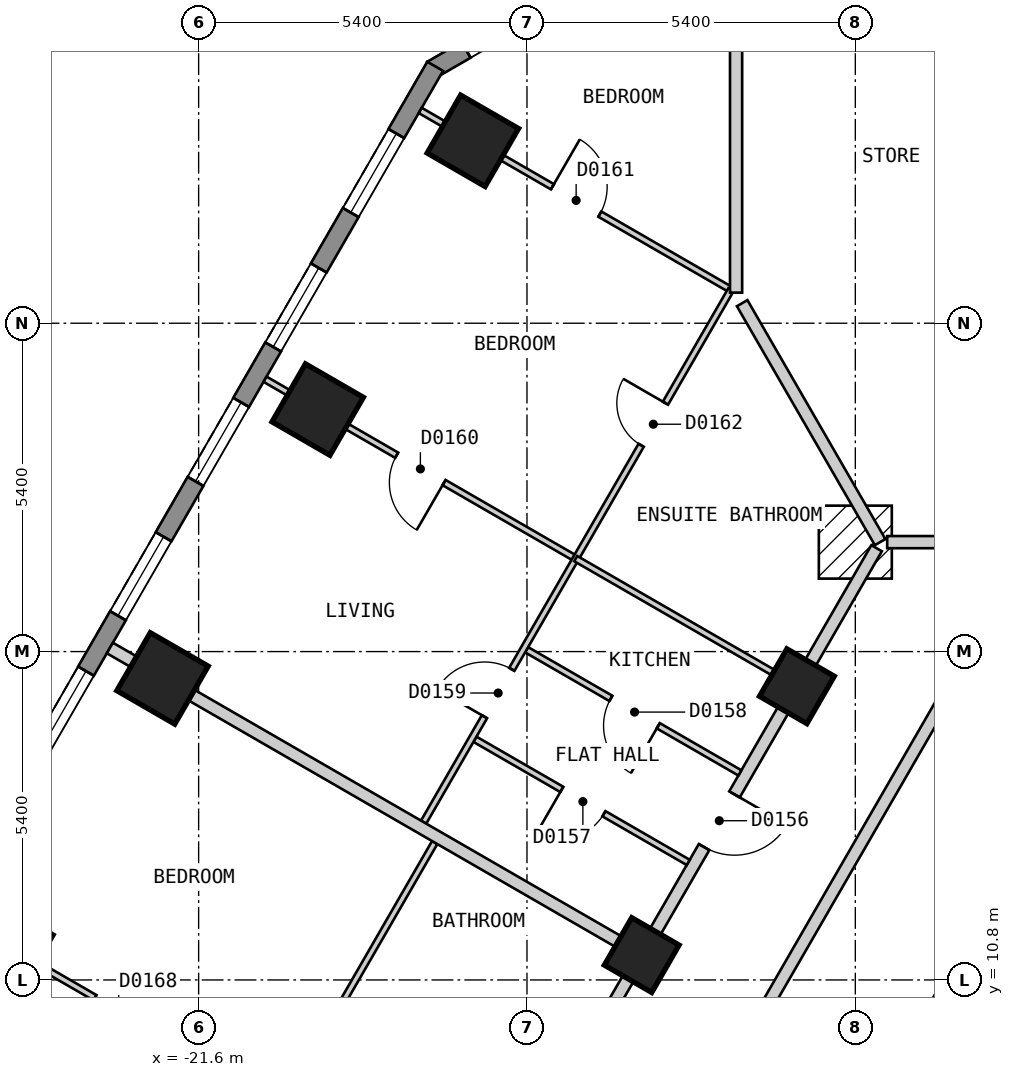
"""IFC4 building model, lengths in metres.
Left out: names, types, materials, properties, quantities, classifications, styles, units other than length and angle.
Written with IfcOpenShell. Run it as: python <this file> out.ifc"""

import sys

from ifc_helpers import new_model, si_unit, direction, frame, frame_2d, origin, origin_2d, place, context, subcontext, project, spatial, polyline, rectangle, outline, extrude, element, fill, save


model = new_model("IFC4")
c1 = context("Model", 3, precision=1e-05, world=origin(), true_north=direction((0.0, 1.0)))
c2 = subcontext(c1, "Body", "Model", "MODEL_VIEW")
j1 = project(units=[si_unit("LENGTHUNIT", "METRE"), si_unit("PLANEANGLEUNIT", "RADIAN")], contexts=[c1])
p1 = place(None, origin())
s1 = spatial("IfcSite", under=j1, at=p1, CompositionType="ELEMENT")
p2 = place(p1, origin())
s2 = spatial("IfcBuilding", under=s1, at=p2, CompositionType="ELEMENT")
p3 = place(p2, frame((0.0, 0.0, 23.4)))
s3 = spatial("IfcBuildingStorey", under=s2, at=p3, CompositionType="ELEMENT", Elevation=23.4)
for number, where, z_axis, x_axis in (
    (1, (-17.09, 24.6, 0.0), (0.0, 0.0, 1.0), (-0.5, -0.866, 0.0)),
    (2, (-19.642, 20.18, 0.0), (0.0, 0.0, 1.0), (-0.5, -0.866, 0.0)),
    (3, (-22.194, 15.759, 0.0), (0.0, 0.0, 1.0), (-0.5, -0.866, 0.0)),
    (4, (-24.746, 11.339, 0.0), (0.0, 0.0, 1.0), (-0.5, -0.866, 0.0)),
):
    element("IfcColumn", number, at=place(p3, frame(where, z_axis=z_axis, x_axis=x_axis)), inside=s3, PredefinedType="COLUMN", context=c2, shape_type="SweptSolid", body=[
        extrude(rectangle(XDim=1.1, YDim=1.1, at=origin_2d()), origin(), (0.0, 0.0, 1.0), 3.0),
    ])
for number, where, z_axis, x_axis in (
    (5, (-11.761, 15.63, 0.0), (0.0, 0.0, 1.0), (-0.5, -0.866, 0.0)),
    (6, (-14.313, 11.209, 0.0), (0.0, 0.0, 1.0), (-0.5, -0.866, 0.0)),
):
    element("IfcColumn", number, at=place(p3, frame(where, z_axis=z_axis, x_axis=x_axis)), inside=s3, PredefinedType="COLUMN", context=c2, shape_type="SweptSolid", body=[
        extrude(rectangle(XDim=0.9, YDim=0.9, at=origin_2d()), origin(), (0.0, 0.0, 1.0), 3.0),
    ])
p4 = place(p3, frame((-13.435, 28.27, 0.0), z_axis=(0.0, 0.0, 1.0), x_axis=(-0.866010750942, -0.50002537861, 0.0)))
e7 = element("IfcWall", 7, at=p4, inside=s3, PredefinedType="SOLIDWALL", context=c2, shape_type="SweptSolid", body=[
    extrude(outline(polyline([(0.0, -0.15), (5.0, -0.15), (4.919, 0.15), (0.08, 0.15), (0.0, -0.15)])), origin(), (0.0, 0.0, 1.0), 2.7),
])
p5 = place(p4, frame((0.65, 0.0, 0.15)))
e8 = element("IfcOpeningElement", 8, at=p5, cuts=e7, PredefinedType="OPENING", context=c2, shape_type="SweptSolid", body=[
    extrude(rectangle(XDim=1.2, YDim=2.1, at=frame_2d((0.6, 1.05))), frame((0.0, 0.16, 0.0), z_axis=(0.0, -1.0, 0.0), x_axis=(1.0, 0.0, 0.0)), (0.0, 0.0, 1.0), 0.32),
])
p6 = place(p4, frame((3.149, 0.0, 0.15)))
e9 = element("IfcOpeningElement", 9, at=p6, cuts=e7, PredefinedType="OPENING", context=c2, shape_type="SweptSolid", body=[
    extrude(rectangle(XDim=1.2, YDim=2.1, at=frame_2d((0.6, 1.05))), frame((0.0, 0.16, 0.0), z_axis=(0.0, -1.0, 0.0), x_axis=(1.0, 0.0, 0.0)), (0.0, 0.0, 1.0), 0.32),
])
p7 = place(p3, frame((-17.71, 25.825, 0.0), z_axis=(0.0, 0.0, 1.0), x_axis=(-0.500001938803, -0.866024284413, 0.0)))
e10 = element("IfcWall", 10, at=p7, inside=s3, PredefinedType="SOLIDWALL", context=c2, shape_type="SweptSolid", body=[
    extrude(outline(polyline([(0.0, -0.15), (27.02, -0.15), (26.94, 0.15), (0.08, 0.15), (0.0, -0.15)])), origin(), (0.0, 0.0, 1.0), 2.7),
])
p8 = place(p7, frame((1.277, 0.0, 0.15)))
e11 = element("IfcOpeningElement", 11, at=p8, cuts=e10, PredefinedType="OPENING", context=c2, shape_type="SweptSolid", body=[
    extrude(rectangle(XDim=1.5, YDim=2.1, at=frame_2d((0.75, 1.05))), frame((0.0, 0.16, 0.0), z_axis=(0.0, -1.0, 0.0), x_axis=(1.0, 0.0, 0.0)), (0.0, 0.0, 1.0), 0.32),
])
p9 = place(p7, frame((3.829, 0.0, 0.15)))
e12 = element("IfcOpeningElement", 12, at=p9, cuts=e10, PredefinedType="OPENING", context=c2, shape_type="SweptSolid", body=[
    extrude(rectangle(XDim=1.5, YDim=2.1, at=frame_2d((0.75, 1.05))), frame((0.0, 0.16, 0.0), z_axis=(0.0, -1.0, 0.0), x_axis=(1.0, 0.0, 0.0)), (0.0, 0.0, 1.0), 0.32),
])
p10 = place(p7, frame((6.382, 0.0, 0.15)))
e13 = element("IfcOpeningElement", 13, at=p10, cuts=e10, PredefinedType="OPENING", context=c2, shape_type="SweptSolid", body=[
    extrude(rectangle(XDim=1.5, YDim=2.1, at=frame_2d((0.75, 1.05))), frame((0.0, 0.16, 0.0), z_axis=(0.0, -1.0, 0.0), x_axis=(1.0, 0.0, 0.0)), (0.0, 0.0, 1.0), 0.32),
])
p11 = place(p7, frame((8.933, 0.0, 0.15)))
e14 = element("IfcOpeningElement", 14, at=p11, cuts=e10, PredefinedType="OPENING", context=c2, shape_type="SweptSolid", body=[
    extrude(rectangle(XDim=1.5, YDim=2.1, at=frame_2d((0.75, 1.05))), frame((0.0, 0.16, 0.0), z_axis=(0.0, -1.0, 0.0), x_axis=(1.0, 0.0, 0.0)), (0.0, 0.0, 1.0), 0.32),
])
p12 = place(p7, frame((11.485, 0.0, 0.15)))
e15 = element("IfcOpeningElement", 15, at=p12, cuts=e10, PredefinedType="OPENING", context=c2, shape_type="SweptSolid", body=[
    extrude(rectangle(XDim=1.5, YDim=2.1, at=frame_2d((0.75, 1.05))), frame((0.0, 0.16, 0.0), z_axis=(0.0, -1.0, 0.0), x_axis=(1.0, 0.0, 0.0)), (0.0, 0.0, 1.0), 0.32),
])
p13 = place(p7, frame((14.037, 0.0, 0.15)))
e16 = element("IfcOpeningElement", 16, at=p13, cuts=e10, PredefinedType="OPENING", context=c2, shape_type="SweptSolid", body=[
    extrude(rectangle(XDim=1.5, YDim=2.1, at=frame_2d((0.75, 1.05))), frame((0.0, 0.16, 0.0), z_axis=(0.0, -1.0, 0.0), x_axis=(1.0, 0.0, 0.0)), (0.0, 0.0, 1.0), 0.32),
])
p14 = place(p7, frame((16.589, 0.0, 0.15)))
e17 = element("IfcOpeningElement", 17, at=p14, cuts=e10, PredefinedType="OPENING", context=c2, shape_type="SweptSolid", body=[
    extrude(rectangle(XDim=1.5, YDim=2.1, at=frame_2d((0.75, 1.05))), frame((0.0, 0.16, 0.0), z_axis=(0.0, -1.0, 0.0), x_axis=(1.0, 0.0, 0.0)), (0.0, 0.0, 1.0), 0.32),
])
p15 = place(p7, frame((19.141, 0.0, 0.15)))
e18 = element("IfcOpeningElement", 18, at=p15, cuts=e10, PredefinedType="OPENING", context=c2, shape_type="SweptSolid", body=[
    extrude(rectangle(XDim=1.5, YDim=2.1, at=frame_2d((0.75, 1.05))), frame((0.0, 0.16, 0.0), z_axis=(0.0, -1.0, 0.0), x_axis=(1.0, 0.0, 0.0)), (0.0, 0.0, 1.0), 0.32),
])
p16 = place(p7, frame((21.693, 0.0, 0.15)))
e19 = element("IfcOpeningElement", 19, at=p16, cuts=e10, PredefinedType="OPENING", context=c2, shape_type="SweptSolid", body=[
    extrude(rectangle(XDim=1.5, YDim=2.1, at=frame_2d((0.75, 1.05))), frame((0.0, 0.16, 0.0), z_axis=(0.0, -1.0, 0.0), x_axis=(1.0, 0.0, 0.0)), (0.0, 0.0, 1.0), 0.32),
])
p17 = place(p7, frame((24.244, 0.0, 0.15)))
e20 = element("IfcOpeningElement", 20, at=p17, cuts=e10, PredefinedType="OPENING", context=c2, shape_type="SweptSolid", body=[
    extrude(rectangle(XDim=1.5, YDim=2.1, at=frame_2d((0.75, 1.05))), frame((0.0, 0.16, 0.0), z_axis=(0.0, -1.0, 0.0), x_axis=(1.0, 0.0, 0.0)), (0.0, 0.0, 1.0), 0.32),
])
p18 = place(p3, frame((-10.276, 18.0, 0.0), z_axis=(0.0, 0.0, 1.0), x_axis=(1.0, 0.0, 0.0)))
e21 = element("IfcWall", 21, at=p18, inside=s3, PredefinedType="PARTITIONING", context=c2, shape_type="SweptSolid", body=[
    extrude(rectangle(XDim=20.61, YDim=0.2, at=frame_2d((10.305, 0.0))), origin(), (0.0, 0.0, 1.0), 2.7),
])
p19 = place(p18, frame((14.879, 0.0, 0.0)))
e22 = element("IfcOpeningElement", 22, at=p19, cuts=e21, PredefinedType="OPENING", context=c2, shape_type="SweptSolid", body=[
    extrude(rectangle(XDim=1.0, YDim=2.1, at=frame_2d((0.5, 1.05))), frame((0.0, 0.11, 0.0), z_axis=(0.0, -1.0, 0.0), x_axis=(1.0, 0.0, 0.0)), (0.0, 0.0, 1.0), 0.22),
])
p20 = place(p18, frame((9.775, 0.0, 0.0)))
e23 = element("IfcOpeningElement", 23, at=p20, cuts=e21, PredefinedType="OPENING", context=c2, shape_type="SweptSolid", body=[
    extrude(rectangle(XDim=1.0, YDim=2.1, at=frame_2d((0.5, 1.05))), frame((0.0, 0.11, 0.0), z_axis=(0.0, -1.0, 0.0), x_axis=(1.0, 0.0, 0.0)), (0.0, 0.0, 1.0), 0.22),
])
p21 = place(p18, frame((4.671, 0.0, 0.0)))
e24 = element("IfcOpeningElement", 24, at=p21, cuts=e21, PredefinedType="OPENING", context=c2, shape_type="SweptSolid", body=[
    extrude(rectangle(XDim=1.0, YDim=2.1, at=frame_2d((0.5, 1.05))), frame((0.0, 0.11, 0.0), z_axis=(0.0, -1.0, 0.0), x_axis=(1.0, 0.0, 0.0)), (0.0, 0.0, 1.0), 0.22),
])
p22 = place(p18, frame((0.837, 0.0, 0.0)))
e25 = element("IfcOpeningElement", 25, at=p22, cuts=e21, PredefinedType="OPENING", context=c2, shape_type="SweptSolid", body=[
    extrude(rectangle(XDim=0.8, YDim=2.1, at=frame_2d((0.4, 1.05))), frame((0.0, 0.11, 0.0), z_axis=(0.0, -1.0, 0.0), x_axis=(1.0, 0.0, 0.0)), (0.0, 0.0, 1.0), 0.22),
])
p23 = place(p3, frame((-10.854, 8.0, 0.0), z_axis=(0.0, 0.0, 1.0), x_axis=(0.499964141897, 0.86604610548, 0.0)))
e26 = element("IfcWall", 26, at=p23, inside=s3, PredefinedType="PARTITIONING", context=c2, shape_type="SweptSolid", body=[
    extrude(rectangle(XDim=9.007, YDim=0.2, at=frame_2d((4.503, 0.0))), origin(), (0.0, 0.0, 1.0), 2.7),
])
p24 = place(p3, frame((-18.244, -0.001, 0.0), z_axis=(0.0, 0.0, 1.0), x_axis=(0.499962999376, 0.866046765051, 0.0)))
e27 = element("IfcWall", 27, at=p24, inside=s3, PredefinedType="PARTITIONING", context=c2, shape_type="SweptSolid", body=[
    extrude(rectangle(XDim=18.245, YDim=0.2, at=frame_2d((9.123, 0.0))), origin(), (0.0, 0.0, 1.0), 2.7),
])
p25 = place(p24, frame((8.672, 0.0, 0.0)))
e28 = element("IfcOpeningElement", 28, at=p25, cuts=e27, PredefinedType="OPENING", context=c2, shape_type="SweptSolid", body=[
    extrude(rectangle(XDim=0.9, YDim=2.1, at=frame_2d((0.45, 1.05))), frame((0.0, 0.11, 0.0), z_axis=(0.0, -1.0, 0.0), x_axis=(1.0, 0.0, 0.0)), (0.0, 0.0, 1.0), 0.22),
])
p26 = place(p3, frame((-20.727, 0.099, 0.0), z_axis=(0.0, 0.0, 1.0), x_axis=(0.499993204491, 0.866029327138, 0.0)))
e29 = element("IfcWall", 29, at=p26, inside=s3, PredefinedType="PARTITIONING", context=c2, shape_type="SweptSolid", body=[
    extrude(rectangle(XDim=20.554, YDim=0.2, at=frame_2d((10.277, 0.0))), origin(), (0.0, 0.0, 1.0), 2.7),
])
p27 = place(p26, frame((14.88, 0.0, 0.0)))
e30 = element("IfcOpeningElement", 30, at=p27, cuts=e29, PredefinedType="OPENING", context=c2, shape_type="SweptSolid", body=[
    extrude(rectangle(XDim=1.0, YDim=2.1, at=frame_2d((0.5, 1.05))), frame((0.0, 0.11, 0.0), z_axis=(0.0, -1.0, 0.0), x_axis=(1.0, 0.0, 0.0)), (0.0, 0.0, 1.0), 0.22),
])
p28 = place(p26, frame((4.673, 0.0, 0.0)))
e31 = element("IfcOpeningElement", 31, at=p28, cuts=e29, PredefinedType="OPENING", context=c2, shape_type="SweptSolid", body=[
    extrude(rectangle(XDim=1.0, YDim=2.1, at=frame_2d((0.5, 1.05))), frame((0.0, 0.11, 0.0), z_axis=(0.0, -1.0, 0.0), x_axis=(1.0, 0.0, 0.0)), (0.0, 0.0, 1.0), 0.22),
])
p29 = place(p3, frame((-25.611, 11.839, 0.0), z_axis=(0.0, 0.0, 1.0), x_axis=(0.866031483044, -0.499989470266, 0.0)))
e32 = element("IfcWall", 32, at=p29, inside=s3, PredefinedType="PARTITIONING", context=c2, shape_type="SweptSolid", body=[
    extrude(rectangle(XDim=6.226, YDim=0.1, at=frame_2d((3.113, 0.0))), origin(), (0.0, 0.0, 1.0), 2.7),
])
p30 = place(p29, frame((2.663, 0.0, 0.0)))
e33 = element("IfcOpeningElement", 33, at=p30, cuts=e32, PredefinedType="OPENING", context=c2, shape_type="SweptSolid", body=[
    extrude(rectangle(XDim=0.9, YDim=2.1, at=frame_2d((0.45, 1.05))), frame((0.0, 0.06, 0.0), z_axis=(0.0, -1.0, 0.0), x_axis=(1.0, 0.0, 0.0)), (0.0, 0.0, 1.0), 0.12),
])
p31 = place(p3, frame((-17.056, 14.758, 0.0), z_axis=(0.0, 0.0, 1.0), x_axis=(0.866035025835, -0.499983333749, 0.0)))
e34 = element("IfcWall", 34, at=p31, inside=s3, PredefinedType="PARTITIONING", context=c2, shape_type="SweptSolid", body=[
    extrude(rectangle(XDim=4.051, YDim=0.1, at=frame_2d((2.025, 0.0))), origin(), (0.0, 0.0, 1.0), 2.7),
])
p32 = place(p31, frame((1.65, 0.0, 0.0)))
e35 = element("IfcOpeningElement", 35, at=p32, cuts=e34, PredefinedType="OPENING", context=c2, shape_type="SweptSolid", body=[
    extrude(rectangle(XDim=0.8, YDim=2.1, at=frame_2d((0.4, 1.05))), frame((0.0, 0.06, 0.0), z_axis=(0.0, -1.0, 0.0), x_axis=(1.0, 0.0, 0.0)), (0.0, 0.0, 1.0), 0.12),
])
p33 = place(p3, frame((-16.206, 16.23, 0.0), z_axis=(0.0, 0.0, 1.0), x_axis=(0.866076189179, -0.499912026797, 0.0)))
e36 = element("IfcWall", 36, at=p33, inside=s3, PredefinedType="PARTITIONING", context=c2, shape_type="SweptSolid", body=[
    extrude(rectangle(XDim=4.051, YDim=0.1, at=frame_2d((2.025, 0.0))), origin(), (0.0, 0.0, 1.0), 2.7),
])
p34 = place(p33, frame((1.6, 0.0, 0.0)))
e37 = element("IfcOpeningElement", 37, at=p34, cuts=e36, PredefinedType="OPENING", context=c2, shape_type="SweptSolid", body=[
    extrude(rectangle(XDim=0.9, YDim=2.1, at=frame_2d((0.45, 1.05))), frame((0.0, 0.06, 0.0), z_axis=(0.0, -1.0, 0.0), x_axis=(1.0, 0.0, 0.0)), (0.0, 0.0, 1.0), 0.12),
])
p35 = place(p3, frame((-20.508, 20.679, 0.0), z_axis=(0.0, 0.0, 1.0), x_axis=(0.866052608538, -0.499952877023, 0.0)))
e38 = element("IfcWall", 38, at=p35, inside=s3, PredefinedType="PARTITIONING", context=c2, shape_type="SweptSolid", body=[
    extrude(rectangle(XDim=5.9, YDim=0.1, at=frame_2d((2.95, 0.0))), origin(), (0.0, 0.0, 1.0), 2.7),
])
p36 = place(p35, frame((2.5, 0.0, 0.0)))
e39 = element("IfcOpeningElement", 39, at=p36, cuts=e38, PredefinedType="OPENING", context=c2, shape_type="SweptSolid", body=[
    extrude(rectangle(XDim=0.9, YDim=2.1, at=frame_2d((0.45, 1.05))), frame((0.0, 0.06, 0.0), z_axis=(0.0, -1.0, 0.0), x_axis=(1.0, 0.0, 0.0)), (0.0, 0.0, 1.0), 0.12),
])
p37 = place(p3, frame((-17.955, 25.099, 0.0), z_axis=(0.0, 0.0, 1.0), x_axis=(0.866069217599, -0.499924104568, 0.0)))
e40 = element("IfcWall", 40, at=p37, inside=s3, PredefinedType="PARTITIONING", context=c2, shape_type="SweptSolid", body=[
    extrude(rectangle(XDim=5.869, YDim=0.1, at=frame_2d((2.935, 0.0))), origin(), (0.0, 0.0, 1.0), 2.7),
])
p38 = place(p37, frame((2.51, 0.0, 0.0)))
e41 = element("IfcOpeningElement", 41, at=p38, cuts=e40, PredefinedType="OPENING", context=c2, shape_type="SweptSolid", body=[
    extrude(rectangle(XDim=0.9, YDim=2.1, at=frame_2d((0.45, 1.05))), frame((0.0, 0.06, 0.0), z_axis=(0.0, -1.0, 0.0), x_axis=(1.0, 0.0, 0.0)), (0.0, 0.0, 1.0), 0.12),
])
p39 = place(p3, frame((-25.2, 0.099, 0.0), z_axis=(0.0, 0.0, 1.0), x_axis=(0.49997477318, 0.866039968006, 0.0)))
e42 = element("IfcWall", 42, at=p39, inside=s3, PredefinedType="PARTITIONING", context=c2, shape_type="SweptSolid", body=[
    extrude(rectangle(XDim=14.965, YDim=0.1, at=frame_2d((7.482, 0.0))), origin(), (0.0, 0.0, 1.0), 2.7),
])
p40 = place(p39, frame((6.96, 0.0, 0.0)))
e43 = element("IfcOpeningElement", 43, at=p40, cuts=e42, PredefinedType="OPENING", context=c2, shape_type="SweptSolid", body=[
    extrude(rectangle(XDim=0.9, YDim=2.1, at=frame_2d((0.45, 1.05))), frame((0.0, 0.06, 0.0), z_axis=(0.0, -1.0, 0.0), x_axis=(1.0, 0.0, 0.0)), (0.0, 0.0, 1.0), 0.12),
])
p41 = place(p3, frame((-17.9, 13.395, 0.0), z_axis=(0.0, 0.0, 1.0), x_axis=(0.499949632511, 0.866054481515, 0.0)))
e44 = element("IfcWall", 44, at=p41, inside=s3, PredefinedType="PARTITIONING", context=c2, shape_type="SweptSolid", body=[
    extrude(rectangle(XDim=10.109, YDim=0.1, at=frame_2d((5.054, 0.0))), origin(), (0.0, 0.0, 1.0), 2.7),
])
p42 = place(p41, frame((2.002, 0.0, 0.0)))
e45 = element("IfcOpeningElement", 45, at=p42, cuts=e44, PredefinedType="OPENING", context=c2, shape_type="SweptSolid", body=[
    extrude(rectangle(XDim=0.9, YDim=2.1, at=frame_2d((0.45, 1.05))), frame((0.0, 0.06, 0.0), z_axis=(0.0, -1.0, 0.0), x_axis=(1.0, 0.0, 0.0)), (0.0, 0.0, 1.0), 0.12),
])
p43 = place(p41, frame((7.156, 0.0, 0.0)))
e46 = element("IfcOpeningElement", 46, at=p43, cuts=e44, PredefinedType="OPENING", context=c2, shape_type="SweptSolid", body=[
    extrude(rectangle(XDim=0.8, YDim=2.1, at=frame_2d((0.4, 1.05))), frame((0.0, 0.06, 0.0), z_axis=(0.0, -1.0, 0.0), x_axis=(1.0, 0.0, 0.0)), (0.0, 0.0, 1.0), 0.12),
])
p44 = place(p3, frame((-12.661, 21.93, 0.0), z_axis=(0.0, 0.0, 1.0), x_axis=(0.499975495332, -0.866039551099, 0.0)))
e47 = element("IfcWall", 47, at=p44, inside=s3, PredefinedType="PARTITIONING", context=c2, shape_type="SweptSolid", body=[
    extrude(rectangle(XDim=4.538, YDim=0.2, at=frame_2d((2.269, 0.0))), origin(), (0.0, 0.0, 1.0), 2.7),
])
p45 = place(p3, frame((-23.06, 16.259, 0.0), z_axis=(0.0, 0.0, 1.0), x_axis=(0.866047370643, -0.499961950354, 0.0)))
e48 = element("IfcWall", 48, at=p45, inside=s3, PredefinedType="PARTITIONING", context=c2, shape_type="SweptSolid", body=[
    extrude(rectangle(XDim=10.001, YDim=0.2, at=frame_2d((5.0, 0.0))), origin(), (0.0, 0.0, 1.0), 2.7),
])
p46 = place(p3, frame((-12.761, 22.103, 0.0), z_axis=(0.0, 0.0, 1.0), x_axis=(0.0, 1.0, 0.0)))
e49 = element("IfcWall", 49, at=p46, inside=s3, PredefinedType="PARTITIONING", context=c2, shape_type="SweptSolid", body=[
    extrude(rectangle(XDim=5.997, YDim=0.2, at=frame_2d((2.999, 0.0))), origin(), (0.0, 0.0, 1.0), 2.7),
])
p47 = place(p3, frame((-15.398, 17.729, 0.0), z_axis=(0.0, 0.0, 1.0), x_axis=(0.866039832988, -0.499975007054, 0.0)))
e50 = element("IfcWall", 50, at=p47, inside=s3, PredefinedType="PARTITIONING", context=c2, shape_type="SweptSolid", body=[
    extrude(rectangle(XDim=4.1, YDim=0.1, at=frame_2d((2.05, 0.0))), origin(), (0.0, 0.0, 1.0), 2.7),
])
p48 = place(p8, origin())
e51 = element("IfcWindow", 51, at=p48, inside=s3, PartitioningType="SINGLE_PANEL", PredefinedType="WINDOW", context=c2, shape_type="SweptSolid", body=[
    extrude(rectangle(XDim=1.5, YDim=2.1, at=frame_2d((0.75, 1.05))), frame((0.0, 0.03, 0.0), z_axis=(0.0, -1.0, 0.0), x_axis=(1.0, 0.0, 0.0)), (0.0, 0.0, 1.0), 0.06),
])
fill(e11, e51)
p49 = place(p9, origin())
e52 = element("IfcWindow", 52, at=p49, inside=s3, PartitioningType="SINGLE_PANEL", PredefinedType="WINDOW", context=c2, shape_type="SweptSolid", body=[
    extrude(rectangle(XDim=1.5, YDim=2.1, at=frame_2d((0.75, 1.05))), frame((0.0, 0.03, 0.0), z_axis=(0.0, -1.0, 0.0), x_axis=(1.0, 0.0, 0.0)), (0.0, 0.0, 1.0), 0.06),
])
fill(e12, e52)
p50 = place(p10, origin())
e53 = element("IfcWindow", 53, at=p50, inside=s3, PartitioningType="SINGLE_PANEL", PredefinedType="WINDOW", context=c2, shape_type="SweptSolid", body=[
    extrude(rectangle(XDim=1.5, YDim=2.1, at=frame_2d((0.75, 1.05))), frame((0.0, 0.03, 0.0), z_axis=(0.0, -1.0, 0.0), x_axis=(1.0, 0.0, 0.0)), (0.0, 0.0, 1.0), 0.06),
])
fill(e13, e53)
p51 = place(p11, origin())
e54 = element("IfcWindow", 54, at=p51, inside=s3, PartitioningType="SINGLE_PANEL", PredefinedType="WINDOW", context=c2, shape_type="SweptSolid", body=[
    extrude(rectangle(XDim=1.5, YDim=2.1, at=frame_2d((0.75, 1.05))), frame((0.0, 0.03, 0.0), z_axis=(0.0, -1.0, 0.0), x_axis=(1.0, 0.0, 0.0)), (0.0, 0.0, 1.0), 0.06),
])
fill(e14, e54)
p52 = place(p12, origin())
e55 = element("IfcWindow", 55, at=p52, inside=s3, PartitioningType="SINGLE_PANEL", PredefinedType="WINDOW", context=c2, shape_type="SweptSolid", body=[
    extrude(rectangle(XDim=1.5, YDim=2.1, at=frame_2d((0.75, 1.05))), frame((0.0, 0.03, 0.0), z_axis=(0.0, -1.0, 0.0), x_axis=(1.0, 0.0, 0.0)), (0.0, 0.0, 1.0), 0.06),
])
fill(e15, e55)
p53 = place(p27, origin())
e56 = element("IfcDoor", 56, at=p53, inside=s3, OperationType="SINGLE_SWING_RIGHT", PredefinedType="DOOR", context=c2, shape_type="SweptSolid", body=[
    extrude(rectangle(XDim=1.0, YDim=2.1, at=frame_2d((0.5, 1.05))), frame((0.0, 0.025, 0.0), z_axis=(0.0, -1.0, 0.0), x_axis=(1.0, 0.0, 0.0)), (0.0, 0.0, 1.0), 0.05),
])
fill(e30, e56)
p54 = place(p32, origin())
e57 = element("IfcDoor", 57, at=p54, inside=s3, OperationType="SINGLE_SWING_LEFT", PredefinedType="DOOR", context=c2, shape_type="SweptSolid", body=[
    extrude(rectangle(XDim=0.8, YDim=2.1, at=frame_2d((0.4, 1.05))), frame((0.0, 0.025, 0.0), z_axis=(0.0, -1.0, 0.0), x_axis=(1.0, 0.0, 0.0)), (0.0, 0.0, 1.0), 0.05),
])
fill(e35, e57)
p55 = place(p34, origin())
e58 = element("IfcDoor", 58, at=p55, inside=s3, OperationType="SINGLE_SWING_RIGHT", PredefinedType="DOOR", context=c2, shape_type="SweptSolid", body=[
    extrude(rectangle(XDim=0.9, YDim=2.1, at=frame_2d((0.45, 1.05))), frame((0.0, 0.025, 0.0), z_axis=(0.0, -1.0, 0.0), x_axis=(1.0, 0.0, 0.0)), (0.0, 0.0, 1.0), 0.05),
])
fill(e37, e58)
p56 = place(p42, origin())
e59 = element("IfcDoor", 59, at=p56, inside=s3, OperationType="SINGLE_SWING_LEFT", PredefinedType="DOOR", context=c2, shape_type="SweptSolid", body=[
    extrude(rectangle(XDim=0.9, YDim=2.1, at=frame_2d((0.45, 1.05))), frame((0.0, 0.025, 0.0), z_axis=(0.0, -1.0, 0.0), x_axis=(1.0, 0.0, 0.0)), (0.0, 0.0, 1.0), 0.05),
])
fill(e45, e59)
p57 = place(p36, origin())
e60 = element("IfcDoor", 60, at=p57, inside=s3, OperationType="SINGLE_SWING_RIGHT", PredefinedType="DOOR", context=c2, shape_type="SweptSolid", body=[
    extrude(rectangle(XDim=0.9, YDim=2.1, at=frame_2d((0.45, 1.05))), frame((0.0, 0.025, 0.0), z_axis=(0.0, -1.0, 0.0), x_axis=(1.0, 0.0, 0.0)), (0.0, 0.0, 1.0), 0.05),
])
fill(e39, e60)
p58 = place(p38, origin())
e61 = element("IfcDoor", 61, at=p58, inside=s3, OperationType="SINGLE_SWING_LEFT", PredefinedType="DOOR", context=c2, shape_type="SweptSolid", body=[
    extrude(rectangle(XDim=0.9, YDim=2.1, at=frame_2d((0.45, 1.05))), frame((0.0, 0.025, 0.0), z_axis=(0.0, -1.0, 0.0), x_axis=(1.0, 0.0, 0.0)), (0.0, 0.0, 1.0), 0.05),
])
fill(e41, e61)
p59 = place(p43, origin())
e62 = element("IfcDoor", 62, at=p59, inside=s3, OperationType="SINGLE_SWING_RIGHT", PredefinedType="DOOR", context=c2, shape_type="SweptSolid", body=[
    extrude(rectangle(XDim=0.8, YDim=2.1, at=frame_2d((0.4, 1.05))), frame((0.0, 0.025, 0.0), z_axis=(0.0, -1.0, 0.0), x_axis=(1.0, 0.0, 0.0)), (0.0, 0.0, 1.0), 0.05),
])
fill(e46, e62)
p60 = place(p30, origin())
e63 = element("IfcDoor", 63, at=p60, inside=s3, OperationType="SINGLE_SWING_RIGHT", PredefinedType="DOOR", context=c2, shape_type="SweptSolid", body=[
    extrude(rectangle(XDim=0.9, YDim=2.1, at=frame_2d((0.45, 1.05))), frame((0.0, 0.025, 0.0), z_axis=(0.0, -1.0, 0.0), x_axis=(1.0, 0.0, 0.0)), (0.0, 0.0, 1.0), 0.05),
])
fill(e33, e63)
save(model, sys.argv[1])
